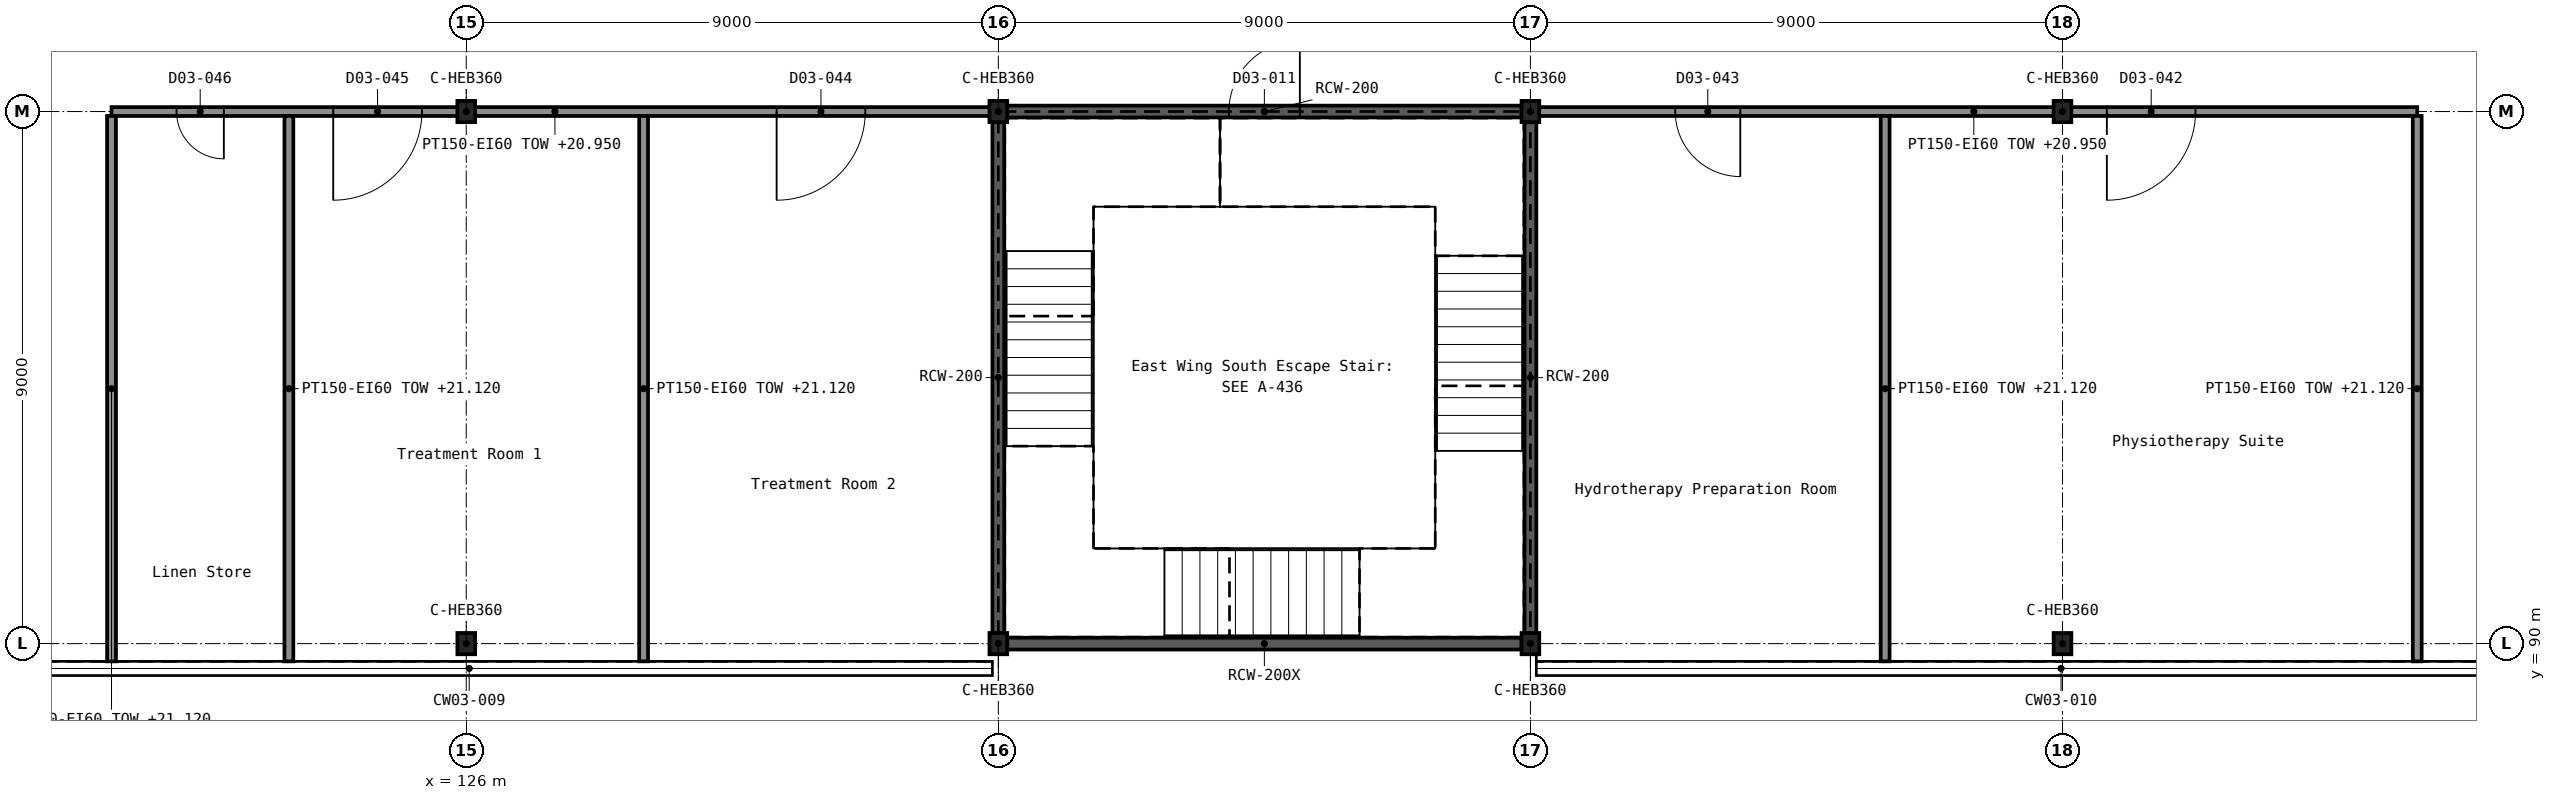
"""IFC4 building model, lengths in metres.
Left out: names, types, materials, properties, quantities, classifications, styles, units other than length and angle.
Written with IfcOpenShell. Run it as: python <this file> out.ifc"""

import sys

from ifc_helpers import new_model, si_unit, direction, frame, frame_2d, origin, origin_2d, place, context, subcontext, project, spatial, rectangle, i_section, extrude, element, fill, save


model = new_model("IFC4")
c1 = context("Model", 3, precision=1e-05, world=origin(), true_north=direction((0.0, 1.0)))
c2 = subcontext(c1, "Body", "Model", "MODEL_VIEW")
j1 = project(units=[si_unit("LENGTHUNIT", "METRE"), si_unit("PLANEANGLEUNIT", "RADIAN")], contexts=[c1])
p1 = place(None, origin())
s1 = spatial("IfcSite", under=j1, at=p1, CompositionType="ELEMENT")
p2 = place(p1, origin())
s2 = spatial("IfcBuilding", under=s1, at=p2, CompositionType="ELEMENT")
p3 = place(p2, frame((0.0, 0.0, 16.2)))
s3 = spatial("IfcBuildingStorey", under=s2, at=p3, CompositionType="ELEMENT", Elevation=16.2)
for number, where, z_axis, x_axis in (
    (1, (126.0, 90.0, 0.0), (0.0, 0.0, 1.0), (1.0, 0.0, 0.0)),
    (2, (135.0, 90.0, 0.0), (0.0, 0.0, 1.0), (1.0, 0.0, 0.0)),
    (3, (144.0, 90.0, 0.0), (0.0, 0.0, 1.0), (1.0, 0.0, 0.0)),
    (4, (153.0, 90.0, 0.0), (0.0, 0.0, 1.0), (1.0, 0.0, 0.0)),
    (5, (126.0, 99.0, 0.0), (0.0, 0.0, 1.0), (1.0, 0.0, 0.0)),
    (6, (135.0, 99.0, 0.0), (0.0, 0.0, 1.0), (1.0, 0.0, 0.0)),
    (7, (144.0, 99.0, 0.0), (0.0, 0.0, 1.0), (1.0, 0.0, 0.0)),
    (8, (153.0, 99.0, 0.0), (0.0, 0.0, 1.0), (1.0, 0.0, 0.0)),
):
    element("IfcColumn", number, at=place(p3, frame(where, z_axis=z_axis, x_axis=x_axis)), inside=s3, PredefinedType="COLUMN", context=c2, shape_type="SweptSolid", body=[
        extrude(i_section(OverallWidth=0.3, OverallDepth=0.36, WebThickness=0.012, FlangeThickness=0.022, FilletRadius=0.027, at=origin_2d()), origin(), (0.0, 0.0, 1.0), 5.4),
    ])
p4 = place(p3, frame((135.15, 90.0, 0.0), z_axis=(0.0, 0.0, 1.0), x_axis=(1.0, 0.0, 0.0)))
e9 = element("IfcWall", 9, at=p4, inside=s3, PredefinedType="SHEAR", context=c2, shape_type="SweptSolid", body=[
    extrude(rectangle(XDim=8.7, YDim=0.2, at=frame_2d((4.35, 0.0))), origin(), (0.0, 0.0, 1.0), 5.4),
])
p5 = place(p3, frame((135.15, 99.0, 0.0), z_axis=(0.0, 0.0, 1.0), x_axis=(1.0, 0.0, 0.0)))
e10 = element("IfcWall", 10, at=p5, inside=s3, PredefinedType="SHEAR", context=c2, shape_type="SweptSolid", body=[
    extrude(rectangle(XDim=8.7, YDim=0.2, at=frame_2d((4.35, 0.0))), origin(), (0.0, 0.0, 1.0), 5.4),
])
p6 = place(p5, frame((3.75, 0.0, 0.0)))
e11 = element("IfcOpeningElement", 11, at=p6, cuts=e10, PredefinedType="OPENING", context=c2, shape_type="SweptSolid", body=[
    extrude(rectangle(XDim=1.2, YDim=2.1, at=frame_2d((0.6, 1.05))), frame((0.0, 0.111, 0.0), z_axis=(0.0, -1.0, 0.0), x_axis=(1.0, 0.0, 0.0)), (0.0, 0.0, 1.0), 0.222),
])
for number, where, z_axis, x_axis in (
    (12, (135.0, 90.18, 0.0), (0.0, 0.0, 1.0), (0.0, 1.0, 0.0)),
    (13, (144.0, 90.18, 0.0), (0.0, 0.0, 1.0), (0.0, 1.0, 0.0)),
):
    element("IfcWall", number, at=place(p3, frame(where, z_axis=z_axis, x_axis=x_axis)), inside=s3, PredefinedType="SHEAR", context=c2, shape_type="SweptSolid", body=[
        extrude(rectangle(XDim=8.64, YDim=0.2, at=frame_2d((4.32, 0.0))), origin(), (0.0, 0.0, 1.0), 5.4),
    ])
p7 = place(p3, frame((120.0, 99.0, 0.0), z_axis=(0.0, 0.0, 1.0), x_axis=(1.0, 0.0, 0.0)))
e14 = element("IfcWall", 14, at=p7, inside=s3, PredefinedType="PARTITIONING", context=c2, shape_type="SweptSolid", body=[
    extrude(rectangle(XDim=15.0, YDim=0.15, at=frame_2d((7.5, 0.0))), origin(), (0.0, 0.0, 1.0), 4.75),
])
p8 = place(p7, frame((11.25, 0.0, 0.0)))
e15 = element("IfcOpeningElement", 15, at=p8, cuts=e14, PredefinedType="OPENING", context=c2, shape_type="SweptSolid", body=[
    extrude(rectangle(XDim=1.5, YDim=2.1, at=frame_2d((0.75, 1.05))), frame((0.0, 0.086, 0.0), z_axis=(0.0, -1.0, 0.0), x_axis=(1.0, 0.0, 0.0)), (0.0, 0.0, 1.0), 0.172),
])
p9 = place(p7, frame((3.75, 0.0, 0.0)))
e16 = element("IfcOpeningElement", 16, at=p9, cuts=e14, PredefinedType="OPENING", context=c2, shape_type="SweptSolid", body=[
    extrude(rectangle(XDim=1.5, YDim=2.1, at=frame_2d((0.75, 1.05))), frame((0.0, 0.086, 0.0), z_axis=(0.0, -1.0, 0.0), x_axis=(1.0, 0.0, 0.0)), (0.0, 0.0, 1.0), 0.172),
])
p10 = place(p7, frame((1.1, 0.0, 0.0)))
e17 = element("IfcOpeningElement", 17, at=p10, cuts=e14, PredefinedType="OPENING", context=c2, shape_type="SweptSolid", body=[
    extrude(rectangle(XDim=0.8, YDim=2.1, at=frame_2d((0.4, 1.05))), frame((0.0, 0.086, 0.0), z_axis=(0.0, -1.0, 0.0), x_axis=(1.0, 0.0, 0.0)), (0.0, 0.0, 1.0), 0.172),
])
p11 = place(p3, frame((144.0, 99.0, 0.0), z_axis=(0.0, 0.0, 1.0), x_axis=(1.0, 0.0, 0.0)))
e18 = element("IfcWall", 18, at=p11, inside=s3, PredefinedType="PARTITIONING", context=c2, shape_type="SweptSolid", body=[
    extrude(rectangle(XDim=15.0, YDim=0.15, at=frame_2d((7.5, 0.0))), origin(), (0.0, 0.0, 1.0), 4.75),
])
p12 = place(p11, frame((9.75, 0.0, 0.0)))
e19 = element("IfcOpeningElement", 19, at=p12, cuts=e18, PredefinedType="OPENING", context=c2, shape_type="SweptSolid", body=[
    extrude(rectangle(XDim=1.5, YDim=2.1, at=frame_2d((0.75, 1.05))), frame((0.0, 0.086, 0.0), z_axis=(0.0, -1.0, 0.0), x_axis=(1.0, 0.0, 0.0)), (0.0, 0.0, 1.0), 0.172),
])
p13 = place(p11, frame((2.45, 0.0, 0.0)))
e20 = element("IfcOpeningElement", 20, at=p13, cuts=e18, PredefinedType="OPENING", context=c2, shape_type="SweptSolid", body=[
    extrude(rectangle(XDim=1.1, YDim=2.4, at=frame_2d((0.55, 1.2))), frame((0.0, 0.086, 0.0), z_axis=(0.0, -1.0, 0.0), x_axis=(1.0, 0.0, 0.0)), (0.0, 0.0, 1.0), 0.172),
])
for number, where, z_axis, x_axis in (
    (21, (120.0, 89.7, 0.0), (0.0, 0.0, 1.0), (0.0, 1.0, 0.0)),
    (22, (123.0, 89.7, 0.0), (0.0, 0.0, 1.0), (0.0, 1.0, 0.0)),
    (23, (129.0, 89.7, 0.0), (0.0, 0.0, 1.0), (0.0, 1.0, 0.0)),
    (24, (150.0, 89.7, 0.0), (0.0, 0.0, 1.0), (0.0, 1.0, 0.0)),
    (25, (159.0, 89.7, 0.0), (0.0, 0.0, 1.0), (0.0, 1.0, 0.0)),
):
    element("IfcWall", number, at=place(p3, frame(where, z_axis=z_axis, x_axis=x_axis)), inside=s3, PredefinedType="PARTITIONING", context=c2, shape_type="SweptSolid", body=[
        extrude(rectangle(XDim=9.225, YDim=0.15, at=frame_2d((4.613, 0.0))), origin(), (0.0, 0.0, 1.0), 4.92),
    ])
p14 = place(p6, origin())
e26 = element("IfcDoor", 26, at=p14, inside=s3, OperationType="SINGLE_SWING_RIGHT", PredefinedType="DOOR", context=c2, shape_type="SweptSolid", body=[
    extrude(rectangle(XDim=1.2, YDim=2.1, at=frame_2d((0.6, 1.05))), frame((0.0, 0.025, 0.0), z_axis=(0.0, -1.0, 0.0), x_axis=(1.0, 0.0, 0.0)), (0.0, 0.0, 1.0), 0.05),
])
fill(e11, e26)
p15 = place(p12, frame((1.5, 0.0, 0.0), z_axis=(0.0, 0.0, 1.0), x_axis=(-1.0, 0.0, 0.0)))
e27 = element("IfcDoor", 27, at=p15, inside=s3, OperationType="DOUBLE_DOOR_SINGLE_SWING", PredefinedType="DOOR", context=c2, shape_type="SweptSolid", body=[
    extrude(rectangle(XDim=1.5, YDim=2.1, at=frame_2d((0.75, 1.05))), frame((0.0, 0.025, 0.0), z_axis=(0.0, -1.0, 0.0), x_axis=(1.0, 0.0, 0.0)), (0.0, 0.0, 1.0), 0.05),
])
fill(e19, e27)
p16 = place(p13, frame((1.1, 0.0, 0.0), z_axis=(0.0, 0.0, 1.0), x_axis=(-1.0, 0.0, 0.0)))
e28 = element("IfcDoor", 28, at=p16, inside=s3, OperationType="SINGLE_SWING_LEFT", PredefinedType="DOOR", context=c2, shape_type="SweptSolid", body=[
    extrude(rectangle(XDim=1.1, YDim=2.4, at=frame_2d((0.55, 1.2))), frame((0.0, 0.025, 0.0), z_axis=(0.0, -1.0, 0.0), x_axis=(1.0, 0.0, 0.0)), (0.0, 0.0, 1.0), 0.05),
])
fill(e20, e28)
p17 = place(p8, frame((1.5, 0.0, 0.0), z_axis=(0.0, 0.0, 1.0), x_axis=(-1.0, 0.0, 0.0)))
e29 = element("IfcDoor", 29, at=p17, inside=s3, OperationType="DOUBLE_DOOR_SINGLE_SWING", PredefinedType="DOOR", context=c2, shape_type="SweptSolid", body=[
    extrude(rectangle(XDim=1.5, YDim=2.1, at=frame_2d((0.75, 1.05))), frame((0.0, 0.025, 0.0), z_axis=(0.0, -1.0, 0.0), x_axis=(1.0, 0.0, 0.0)), (0.0, 0.0, 1.0), 0.05),
])
fill(e15, e29)
p18 = place(p9, frame((1.5, 0.0, 0.0), z_axis=(0.0, 0.0, 1.0), x_axis=(-1.0, 0.0, 0.0)))
e30 = element("IfcDoor", 30, at=p18, inside=s3, OperationType="DOUBLE_DOOR_SINGLE_SWING", PredefinedType="DOOR", context=c2, shape_type="SweptSolid", body=[
    extrude(rectangle(XDim=1.5, YDim=2.1, at=frame_2d((0.75, 1.05))), frame((0.0, 0.025, 0.0), z_axis=(0.0, -1.0, 0.0), x_axis=(1.0, 0.0, 0.0)), (0.0, 0.0, 1.0), 0.05),
])
fill(e16, e30)
p19 = place(p10, frame((0.8, 0.0, 0.0), z_axis=(0.0, 0.0, 1.0), x_axis=(-1.0, 0.0, 0.0)))
e31 = element("IfcDoor", 31, at=p19, inside=s3, OperationType="SINGLE_SWING_LEFT", PredefinedType="DOOR", context=c2, shape_type="SweptSolid", body=[
    extrude(rectangle(XDim=0.8, YDim=2.1, at=frame_2d((0.4, 1.05))), frame((0.0, 0.025, 0.0), z_axis=(0.0, -1.0, 0.0), x_axis=(1.0, 0.0, 0.0)), (0.0, 0.0, 1.0), 0.05),
])
fill(e17, e31)
save(model, sys.argv[1])
